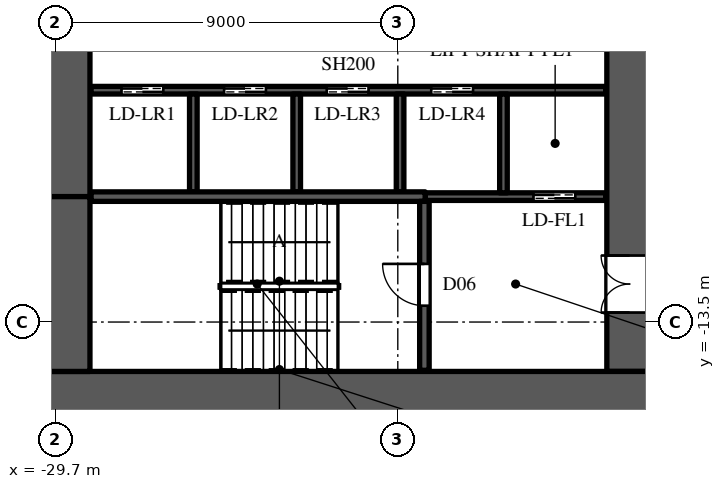
"""IFC4 building model, lengths in metres.
Left out: names, types, materials, properties, quantities, classifications, styles, units other than length and angle.
Written with IfcOpenShell. Run it as: python <this file> out.ifc"""

import sys

from ifc_helpers import new_model, si_unit, direction, frame, frame_2d, origin, place, context, subcontext, project, spatial, rectangle, extrude, element, fill, save


model = new_model("IFC4")
c1 = context("Model", 3, precision=1e-05, world=origin(), true_north=direction((0.0, 1.0)))
c2 = subcontext(c1, "Body", "Model", "MODEL_VIEW")
j1 = project(units=[si_unit("LENGTHUNIT", "METRE"), si_unit("PLANEANGLEUNIT", "RADIAN")], contexts=[c1])
p1 = place(None, origin())
s1 = spatial("IfcSite", under=j1, at=p1, CompositionType="ELEMENT")
p2 = place(p1, origin())
s2 = spatial("IfcBuilding", under=s1, at=p2, CompositionType="ELEMENT")
p3 = place(p2, frame((0.0, 0.0, 36.0)))
s3 = spatial("IfcBuildingStorey", under=s2, at=p3, CompositionType="ELEMENT", Elevation=36.0)
p4 = place(p3, frame((-30.0, -15.4, 0.0), z_axis=(0.0, 0.0, 1.0), x_axis=(1.0, 0.0, 0.0)))
e1 = element("IfcWall", 1, at=p4, inside=s3, PredefinedType="SHEAR", context=c2, shape_type="SweptSolid", body=[
    extrude(rectangle(XDim=16.0, YDim=1.2, at=frame_2d((8.0, 0.0))), origin(), (0.0, 0.0, 1.0), 8.0),
])
p5 = place(p3, frame((-14.6, -14.8, 0.0), z_axis=(0.0, 0.0, 1.0), x_axis=(0.0, 1.0, 0.0)))
e2 = element("IfcWall", 2, at=p5, inside=s3, PredefinedType="SHEAR", context=c2, shape_type="SweptSolid", body=[
    extrude(rectangle(XDim=29.6, YDim=1.2, at=frame_2d((14.8, 0.0))), origin(), (0.0, 0.0, 1.0), 8.0),
])
p6 = place(p5, frame((1.55, 0.0, 0.0)))
e3 = element("IfcOpeningElement", 3, at=p6, cuts=e2, PredefinedType="OPENING", context=c2, shape_type="SweptSolid", body=[
    extrude(rectangle(XDim=1.5, YDim=2.4, at=frame_2d((0.75, 1.2))), frame((0.0, 0.61, 0.0), z_axis=(0.0, -1.0, 0.0), x_axis=(1.0, 0.0, 0.0)), (0.0, 0.0, 1.0), 1.22),
])
p7 = place(p5, frame((26.55, 0.0, 0.0)))
e4 = element("IfcOpeningElement", 4, at=p7, cuts=e2, PredefinedType="OPENING", context=c2, shape_type="SweptSolid", body=[
    extrude(rectangle(XDim=1.5, YDim=2.4, at=frame_2d((0.75, 1.2))), frame((0.0, 0.61, 0.0), z_axis=(0.0, -1.0, 0.0), x_axis=(1.0, 0.0, 0.0)), (0.0, 0.0, 1.0), 1.22),
])
p8 = place(p5, frame((8.45, 0.0, 0.0)))
e5 = element("IfcOpeningElement", 5, at=p8, cuts=e2, PredefinedType="OPENING", context=c2, shape_type="SweptSolid", body=[
    extrude(rectangle(XDim=1.5, YDim=2.4, at=frame_2d((0.75, 1.2))), frame((0.0, 0.61, 0.0), z_axis=(0.0, -1.0, 0.0), x_axis=(1.0, 0.0, 0.0)), (0.0, 0.0, 1.0), 1.22),
])
p9 = place(p5, frame((19.65, 0.0, 0.0)))
e6 = element("IfcOpeningElement", 6, at=p9, cuts=e2, PredefinedType="OPENING", context=c2, shape_type="SweptSolid", body=[
    extrude(rectangle(XDim=1.5, YDim=2.4, at=frame_2d((0.75, 1.2))), frame((0.0, 0.61, 0.0), z_axis=(0.0, -1.0, 0.0), x_axis=(1.0, 0.0, 0.0)), (0.0, 0.0, 1.0), 1.22),
])
p10 = place(p5, frame((14.5, 0.0, 0.0)))
e7 = element("IfcOpeningElement", 7, at=p10, cuts=e2, PredefinedType="OPENING", context=c2, shape_type="SweptSolid", body=[
    extrude(rectangle(XDim=0.6, YDim=2.0, at=frame_2d((0.3, 1.0))), frame((0.0, 0.61, 0.0), z_axis=(0.0, -1.0, 0.0), x_axis=(1.0, 0.0, 0.0)), (0.0, 0.0, 1.0), 1.22),
])
p11 = place(p3, frame((-29.4, -10.2, 0.0), z_axis=(0.0, 0.0, 1.0), x_axis=(0.0, 1.0, 0.0)))
e8 = element("IfcWall", 8, at=p11, inside=s3, PredefinedType="SHEAR", context=c2, shape_type="SweptSolid", body=[
    extrude(rectangle(XDim=20.4, YDim=1.2, at=frame_2d((10.2, 0.0))), origin(), (0.0, 0.0, 1.0), 8.0),
])
p12 = place(p3, frame((-29.4, -14.8, 0.0), z_axis=(0.0, 0.0, 1.0), x_axis=(0.0, 1.0, 0.0)))
e9 = element("IfcWall", 9, at=p12, inside=s3, PredefinedType="SHEAR", context=c2, shape_type="SweptSolid", body=[
    extrude(rectangle(XDim=4.6, YDim=1.2, at=frame_2d((2.3, 0.0))), origin(), (0.0, 0.0, 1.0), 8.0),
])
p13 = place(p3, frame((-28.77, -7.4, 0.0), z_axis=(0.0, 0.0, 1.0), x_axis=(1.0, 0.0, 0.0)))
e10 = element("IfcWall", 10, at=p13, inside=s3, PredefinedType="SHEAR", context=c2, shape_type="SweptSolid", body=[
    extrude(rectangle(XDim=13.54, YDim=0.2, at=frame_2d((6.77, 0.0))), origin(), (0.0, 0.0, 1.0), 7.598),
])
p14 = place(p13, frame((0.8, 0.0, 0.0)))
e11 = element("IfcOpeningElement", 11, at=p14, cuts=e10, PredefinedType="OPENING", context=c2, shape_type="SweptSolid", body=[
    extrude(rectangle(XDim=1.1, YDim=2.2, at=frame_2d((0.55, 1.1))), frame((0.0, 0.11, 0.0), z_axis=(0.0, -1.0, 0.0), x_axis=(1.0, 0.0, 0.0)), (0.0, 0.0, 1.0), 0.22),
])
p15 = place(p13, frame((3.5, 0.0, 0.0)))
e12 = element("IfcOpeningElement", 12, at=p15, cuts=e10, PredefinedType="OPENING", context=c2, shape_type="SweptSolid", body=[
    extrude(rectangle(XDim=1.1, YDim=2.2, at=frame_2d((0.55, 1.1))), frame((0.0, 0.11, 0.0), z_axis=(0.0, -1.0, 0.0), x_axis=(1.0, 0.0, 0.0)), (0.0, 0.0, 1.0), 0.22),
])
p16 = place(p13, frame((6.2, 0.0, 0.0)))
e13 = element("IfcOpeningElement", 13, at=p16, cuts=e10, PredefinedType="OPENING", context=c2, shape_type="SweptSolid", body=[
    extrude(rectangle(XDim=1.1, YDim=2.2, at=frame_2d((0.55, 1.1))), frame((0.0, 0.11, 0.0), z_axis=(0.0, -1.0, 0.0), x_axis=(1.0, 0.0, 0.0)), (0.0, 0.0, 1.0), 0.22),
])
p17 = place(p13, frame((8.95, 0.0, 0.0)))
e14 = element("IfcOpeningElement", 14, at=p17, cuts=e10, PredefinedType="OPENING", context=c2, shape_type="SweptSolid", body=[
    extrude(rectangle(XDim=1.1, YDim=2.2, at=frame_2d((0.55, 1.1))), frame((0.0, 0.11, 0.0), z_axis=(0.0, -1.0, 0.0), x_axis=(1.0, 0.0, 0.0)), (0.0, 0.0, 1.0), 0.22),
])
for number, where, z_axis, x_axis in (
    (15, (-26.08, -10.075, 0.0), (0.0, 0.0, 1.0), (0.0, 1.0, 0.0)),
    (16, (-23.36, -10.075, 0.0), (0.0, 0.0, 1.0), (0.0, 1.0, 0.0)),
    (17, (-20.64, -10.075, 0.0), (0.0, 0.0, 1.0), (0.0, 1.0, 0.0)),
):
    element("IfcWall", number, at=place(p3, frame(where, z_axis=z_axis, x_axis=x_axis)), inside=s3, PredefinedType="SHEAR", context=c2, shape_type="SweptSolid", body=[
        extrude(rectangle(XDim=2.575, YDim=0.2, at=frame_2d((1.288, 0.0))), origin(), (0.0, 0.0, 1.0), 8.0),
    ])
p18 = place(p3, frame((-19.98, -10.2, 0.0), z_axis=(0.0, 0.0, 1.0), x_axis=(1.0, 0.0, 0.0)))
e18 = element("IfcWall", 18, at=p18, inside=s3, PredefinedType="SHEAR", context=c2, shape_type="SweptSolid", body=[
    extrude(rectangle(XDim=4.75, YDim=0.2, at=frame_2d((2.375, 0.0))), origin(), (0.0, 0.0, 1.0), 7.598),
])
p19 = place(p18, frame((2.85, 0.0, 0.0)))
e19 = element("IfcOpeningElement", 19, at=p19, cuts=e18, PredefinedType="OPENING", context=c2, shape_type="SweptSolid", body=[
    extrude(rectangle(XDim=1.1, YDim=2.2, at=frame_2d((0.55, 1.1))), frame((0.0, 0.11, 0.0), z_axis=(0.0, -1.0, 0.0), x_axis=(1.0, 0.0, 0.0)), (0.0, 0.0, 1.0), 0.22),
])
p20 = place(p3, frame((-17.92, -10.1, 0.0), z_axis=(0.0, 0.0, 1.0), x_axis=(0.0, 1.0, 0.0)))
e20 = element("IfcWall", 20, at=p20, inside=s3, PredefinedType="SHEAR", context=c2, shape_type="SweptSolid", body=[
    extrude(rectangle(XDim=2.6, YDim=0.2, at=frame_2d((1.3, 0.0))), origin(), (0.0, 0.0, 1.0), 8.0),
])
p21 = place(p3, frame((-28.77, -10.2, 0.0), z_axis=(0.0, 0.0, 1.0), x_axis=(1.0, 0.0, 0.0)))
e21 = element("IfcWall", 21, at=p21, inside=s3, PredefinedType="SHEAR", context=c2, shape_type="SweptSolid", body=[
    extrude(rectangle(XDim=8.79, YDim=0.25, at=frame_2d((4.395, 0.0))), origin(), (0.0, 0.0, 1.0), 7.598),
])
p22 = place(p3, frame((-20.0, -14.77, 0.0), z_axis=(0.0, 0.0, 1.0), x_axis=(0.0, 1.0, 0.0)))
e22 = element("IfcWall", 22, at=p22, inside=s3, PredefinedType="SHEAR", context=c2, shape_type="SweptSolid", body=[
    extrude(rectangle(XDim=4.445, YDim=0.25, at=frame_2d((2.223, 0.0))), origin(), (0.0, 0.0, 1.0), 7.598),
])
p23 = place(p22, frame((1.7, 0.0, 0.0)))
e23 = element("IfcOpeningElement", 23, at=p23, cuts=e22, PredefinedType="OPENING", context=c2, shape_type="SweptSolid", body=[
    extrude(rectangle(XDim=1.1, YDim=2.2, at=frame_2d((0.55, 1.1))), frame((0.0, 0.135, 0.0), z_axis=(0.0, -1.0, 0.0), x_axis=(1.0, 0.0, 0.0)), (0.0, 0.0, 1.0), 0.27),
])
p24 = place(p23, origin())
e24 = element("IfcDoor", 24, at=p24, inside=s3, OperationType="SINGLE_SWING_RIGHT", PredefinedType="DOOR", context=c2, shape_type="SweptSolid", body=[
    extrude(rectangle(XDim=1.1, YDim=2.2, at=frame_2d((0.55, 1.1))), frame((0.0, 0.025, 0.0), z_axis=(0.0, -1.0, 0.0), x_axis=(1.0, 0.0, 0.0)), (0.0, 0.0, 1.0), 0.05),
])
fill(e23, e24)
p25 = place(p14, origin())
e25 = element("IfcDoor", 25, at=p25, inside=s3, OperationType="DOUBLE_DOOR_SLIDING", PredefinedType="DOOR", context=c2, shape_type="SweptSolid", body=[
    extrude(rectangle(XDim=1.1, YDim=2.2, at=frame_2d((0.55, 1.1))), frame((0.0, 0.025, 0.0), z_axis=(0.0, -1.0, 0.0), x_axis=(1.0, 0.0, 0.0)), (0.0, 0.0, 1.0), 0.05),
])
fill(e11, e25)
p26 = place(p15, origin())
e26 = element("IfcDoor", 26, at=p26, inside=s3, OperationType="DOUBLE_DOOR_SLIDING", PredefinedType="DOOR", context=c2, shape_type="SweptSolid", body=[
    extrude(rectangle(XDim=1.1, YDim=2.2, at=frame_2d((0.55, 1.1))), frame((0.0, 0.025, 0.0), z_axis=(0.0, -1.0, 0.0), x_axis=(1.0, 0.0, 0.0)), (0.0, 0.0, 1.0), 0.05),
])
fill(e12, e26)
p27 = place(p16, origin())
e27 = element("IfcDoor", 27, at=p27, inside=s3, OperationType="DOUBLE_DOOR_SLIDING", PredefinedType="DOOR", context=c2, shape_type="SweptSolid", body=[
    extrude(rectangle(XDim=1.1, YDim=2.2, at=frame_2d((0.55, 1.1))), frame((0.0, 0.025, 0.0), z_axis=(0.0, -1.0, 0.0), x_axis=(1.0, 0.0, 0.0)), (0.0, 0.0, 1.0), 0.05),
])
fill(e13, e27)
p28 = place(p17, origin())
e28 = element("IfcDoor", 28, at=p28, inside=s3, OperationType="DOUBLE_DOOR_SLIDING", PredefinedType="DOOR", context=c2, shape_type="SweptSolid", body=[
    extrude(rectangle(XDim=1.1, YDim=2.2, at=frame_2d((0.55, 1.1))), frame((0.0, 0.025, 0.0), z_axis=(0.0, -1.0, 0.0), x_axis=(1.0, 0.0, 0.0)), (0.0, 0.0, 1.0), 0.05),
])
fill(e14, e28)
p29 = place(p19, origin())
e29 = element("IfcDoor", 29, at=p29, inside=s3, OperationType="DOUBLE_DOOR_SLIDING", PredefinedType="DOOR", context=c2, shape_type="SweptSolid", body=[
    extrude(rectangle(XDim=1.1, YDim=2.2, at=frame_2d((0.55, 1.1))), frame((0.0, 0.025, 0.0), z_axis=(0.0, -1.0, 0.0), x_axis=(1.0, 0.0, 0.0)), (0.0, 0.0, 1.0), 0.05),
])
fill(e19, e29)
p30 = place(p6, origin())
e30 = element("IfcDoor", 30, at=p30, inside=s3, OperationType="DOUBLE_DOOR_SINGLE_SWING", PredefinedType="DOOR", context=c2, shape_type="SweptSolid", body=[
    extrude(rectangle(XDim=1.5, YDim=2.4, at=frame_2d((0.75, 1.2))), frame((0.0, 0.025, 0.0), z_axis=(0.0, -1.0, 0.0), x_axis=(1.0, 0.0, 0.0)), (0.0, 0.0, 1.0), 0.05),
])
fill(e3, e30)
save(model, sys.argv[1])
